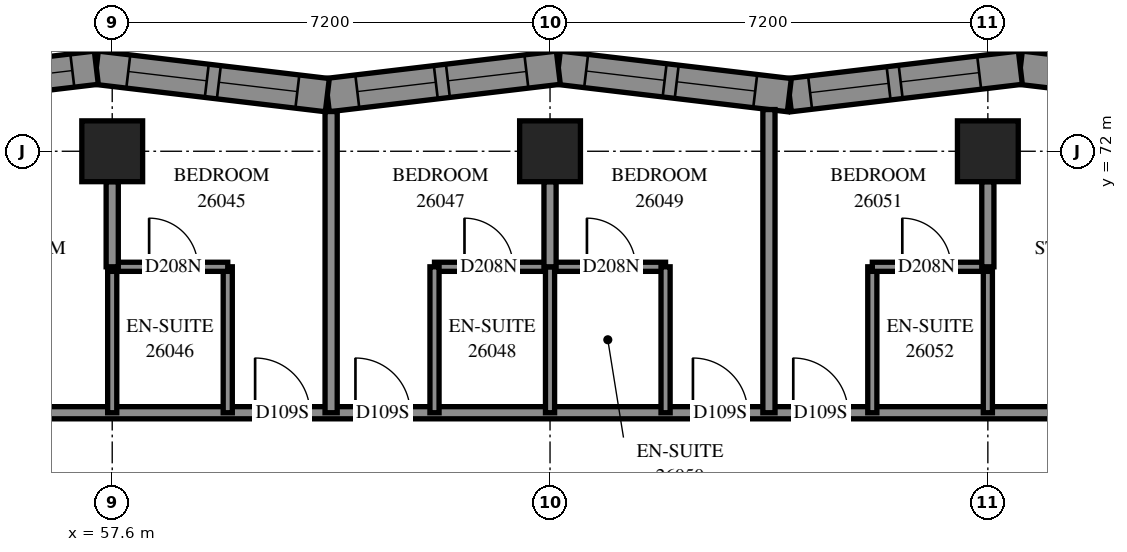
"""IFC4 building model, lengths in metres.
Left out: names, types, materials, properties, quantities, classifications, styles, units other than length and angle.
Written with IfcOpenShell. Run it as: python <this file> out.ifc"""

import sys

from ifc_helpers import new_model, si_unit, direction, frame, frame_2d, origin, origin_2d, place, context, subcontext, project, spatial, polyline, rectangle, outline, extrude, element, fill, save


model = new_model("IFC4")
c1 = context("Model", 3, precision=1e-05, world=origin(), true_north=direction((0.0, 1.0)))
c2 = subcontext(c1, "Body", "Model", "MODEL_VIEW")
j1 = project(units=[si_unit("LENGTHUNIT", "METRE"), si_unit("PLANEANGLEUNIT", "RADIAN")], contexts=[c1])
p1 = place(None, origin())
s1 = spatial("IfcSite", under=j1, at=p1, CompositionType="ELEMENT")
p2 = place(p1, origin())
s2 = spatial("IfcBuilding", under=s1, at=p2, CompositionType="ELEMENT")
p3 = place(p2, frame((0.0, 0.0, 98.2)))
s3 = spatial("IfcBuildingStorey", under=s2, at=p3, CompositionType="ELEMENT", Elevation=98.2)
for number, where, z_axis, x_axis in (
    (1, (57.6, 72.0, 0.0), (0.0, 0.0, 1.0), (1.0, 0.0, 0.0)),
    (2, (64.8, 72.0, 0.0), (0.0, 0.0, 1.0), (1.0, 0.0, 0.0)),
    (3, (72.0, 72.0, 0.0), (0.0, 0.0, 1.0), (1.0, 0.0, 0.0)),
):
    element("IfcColumn", number, at=place(p3, frame(where, z_axis=z_axis, x_axis=x_axis)), inside=s3, PredefinedType="COLUMN", context=c2, shape_type="SweptSolid", body=[
        extrude(rectangle(XDim=1.0, YDim=1.0, at=origin_2d()), origin(), (0.0, 0.0, 1.0), 3.1),
    ])
p4 = place(p3, frame((76.355, 72.921, 0.0), z_axis=(0.0, 0.0, 1.0), x_axis=(-0.9930244072, 0.1179089763, 0.0)))
e4 = element("IfcWall", 4, at=p4, inside=s3, PredefinedType="SOLIDWALL", context=c2, shape_type="SweptSolid", body=[
    extrude(outline(polyline([(0.054, -0.275), (3.88, -0.275), (3.814, 0.275), (-0.054, 0.275), (0.054, -0.275)])), origin(), (0.0, 0.0, 1.0), 3.1),
])
p5 = place(p4, frame((1.587, 0.0, 0.5)))
e5 = element("IfcOpeningElement", 5, at=p5, cuts=e4, PredefinedType="OPENING", context=c2, shape_type="SweptSolid", body=[
    extrude(rectangle(XDim=1.2, YDim=2.45, at=frame_2d((0.6, 1.225))), frame((0.0, 0.285, 0.0), z_axis=(0.0, -1.0, 0.0), x_axis=(1.0, 0.0, 0.0)), (0.0, 0.0, 1.0), 0.57),
])
p6 = place(p3, frame((72.534, 73.374, 0.0), z_axis=(0.0, 0.0, 1.0), x_axis=(-0.9930269402, -0.1178876415, 0.0)))
e6 = element("IfcWall", 6, at=p6, inside=s3, PredefinedType="SOLIDWALL", context=c2, shape_type="SweptSolid", body=[
    extrude(outline(polyline([(-0.033, -0.275), (3.793, -0.275), (3.858, 0.275), (0.033, 0.275), (-0.033, -0.275)])), origin(), (0.0, 0.0, 1.0), 3.1),
])
p7 = place(p6, frame((0.682, 0.0, 0.5)))
e7 = element("IfcOpeningElement", 7, at=p7, cuts=e6, PredefinedType="OPENING", context=c2, shape_type="SweptSolid", body=[
    extrude(rectangle(XDim=1.3, YDim=2.45, at=frame_2d((0.65, 1.225))), frame((0.0, 0.285, 0.0), z_axis=(0.0, -1.0, 0.0), x_axis=(1.0, 0.0, 0.0)), (0.0, 0.0, 1.0), 0.57),
])
p8 = place(p6, frame((2.182, 0.0, 0.5)))
e8 = element("IfcOpeningElement", 8, at=p8, cuts=e6, PredefinedType="OPENING", context=c2, shape_type="SweptSolid", body=[
    extrude(rectangle(XDim=1.3, YDim=2.45, at=frame_2d((0.65, 1.225))), frame((0.0, 0.285, 0.0), z_axis=(0.0, -1.0, 0.0), x_axis=(1.0, 0.0, 0.0)), (0.0, 0.0, 1.0), 0.57),
])
p9 = place(p3, frame((68.736, 72.923, 0.0), z_axis=(0.0, 0.0, 1.0), x_axis=(-0.9930265769, 0.1178907016, 0.0)))
e9 = element("IfcWall", 9, at=p9, inside=s3, PredefinedType="SOLIDWALL", context=c2, shape_type="SweptSolid", body=[
    extrude(outline(polyline([(0.033, -0.275), (3.858, -0.275), (3.793, 0.275), (-0.033, 0.275), (0.033, -0.275)])), origin(), (0.0, 0.0, 1.0), 3.1),
])
p10 = place(p9, frame((0.565, 0.0, 0.5)))
e10 = element("IfcOpeningElement", 10, at=p10, cuts=e9, PredefinedType="OPENING", context=c2, shape_type="SweptSolid", body=[
    extrude(rectangle(XDim=1.3, YDim=2.45, at=frame_2d((0.65, 1.225))), frame((0.0, 0.285, 0.0), z_axis=(0.0, -1.0, 0.0), x_axis=(1.0, 0.0, 0.0)), (0.0, 0.0, 1.0), 0.57),
])
p11 = place(p9, frame((2.065, 0.0, 0.5)))
e11 = element("IfcOpeningElement", 11, at=p11, cuts=e9, PredefinedType="OPENING", context=c2, shape_type="SweptSolid", body=[
    extrude(rectangle(XDim=1.3, YDim=2.45, at=frame_2d((0.65, 1.225))), frame((0.0, 0.285, 0.0), z_axis=(0.0, -1.0, 0.0), x_axis=(1.0, 0.0, 0.0)), (0.0, 0.0, 1.0), 0.57),
])
p12 = place(p3, frame((64.937, 73.374, 0.0), z_axis=(0.0, 0.0, 1.0), x_axis=(-0.9930269402, -0.1178876415, 0.0)))
e12 = element("IfcWall", 12, at=p12, inside=s3, PredefinedType="SOLIDWALL", context=c2, shape_type="SweptSolid", body=[
    extrude(outline(polyline([(-0.033, -0.275), (3.793, -0.275), (3.858, 0.275), (0.033, 0.275), (-0.033, -0.275)])), origin(), (0.0, 0.0, 1.0), 3.1),
])
p13 = place(p12, frame((0.529, 0.0, 0.5)))
e13 = element("IfcOpeningElement", 13, at=p13, cuts=e12, PredefinedType="OPENING", context=c2, shape_type="SweptSolid", body=[
    extrude(rectangle(XDim=1.3, YDim=2.45, at=frame_2d((0.65, 1.225))), frame((0.0, 0.285, 0.0), z_axis=(0.0, -1.0, 0.0), x_axis=(1.0, 0.0, 0.0)), (0.0, 0.0, 1.0), 0.57),
])
p14 = place(p12, frame((2.029, 0.0, 0.5)))
e14 = element("IfcOpeningElement", 14, at=p14, cuts=e12, PredefinedType="OPENING", context=c2, shape_type="SweptSolid", body=[
    extrude(rectangle(XDim=1.3, YDim=2.45, at=frame_2d((0.65, 1.225))), frame((0.0, 0.285, 0.0), z_axis=(0.0, -1.0, 0.0), x_axis=(1.0, 0.0, 0.0)), (0.0, 0.0, 1.0), 0.57),
])
p15 = place(p3, frame((61.138, 72.923, 0.0), z_axis=(0.0, 0.0, 1.0), x_axis=(-0.9930269402, 0.1178876415, 0.0)))
e15 = element("IfcWall", 15, at=p15, inside=s3, PredefinedType="SOLIDWALL", context=c2, shape_type="SweptSolid", body=[
    extrude(outline(polyline([(0.033, -0.275), (3.858, -0.275), (3.793, 0.275), (-0.033, 0.275), (0.033, -0.275)])), origin(), (0.0, 0.0, 1.0), 3.1),
])
p16 = place(p15, frame((0.496, 0.0, 0.5)))
e16 = element("IfcOpeningElement", 16, at=p16, cuts=e15, PredefinedType="OPENING", context=c2, shape_type="SweptSolid", body=[
    extrude(rectangle(XDim=1.3, YDim=2.45, at=frame_2d((0.65, 1.225))), frame((0.0, 0.285, 0.0), z_axis=(0.0, -1.0, 0.0), x_axis=(1.0, 0.0, 0.0)), (0.0, 0.0, 1.0), 0.57),
])
p17 = place(p15, frame((1.996, 0.0, 0.5)))
e17 = element("IfcOpeningElement", 17, at=p17, cuts=e15, PredefinedType="OPENING", context=c2, shape_type="SweptSolid", body=[
    extrude(rectangle(XDim=1.3, YDim=2.45, at=frame_2d((0.65, 1.225))), frame((0.0, 0.285, 0.0), z_axis=(0.0, -1.0, 0.0), x_axis=(1.0, 0.0, 0.0)), (0.0, 0.0, 1.0), 0.57),
])
p18 = place(p3, frame((57.339, 73.374, 0.0), z_axis=(0.0, 0.0, 1.0), x_axis=(-0.9930265769, -0.1178907016, 0.0)))
e18 = element("IfcWall", 18, at=p18, inside=s3, PredefinedType="SOLIDWALL", context=c2, shape_type="SweptSolid", body=[
    extrude(outline(polyline([(-0.033, -0.275), (3.793, -0.275), (3.858, 0.275), (0.033, 0.275), (-0.033, -0.275)])), origin(), (0.0, 0.0, 1.0), 3.1),
])
p19 = place(p18, frame((0.397, 0.0, 0.5)))
e19 = element("IfcOpeningElement", 19, at=p19, cuts=e18, PredefinedType="OPENING", context=c2, shape_type="SweptSolid", body=[
    extrude(rectangle(XDim=1.3, YDim=2.45, at=frame_2d((0.65, 1.225))), frame((0.0, 0.285, 0.0), z_axis=(0.0, -1.0, 0.0), x_axis=(1.0, 0.0, 0.0)), (0.0, 0.0, 1.0), 0.57),
])
p20 = place(p18, frame((1.897, 0.0, 0.5)))
e20 = element("IfcOpeningElement", 20, at=p20, cuts=e18, PredefinedType="OPENING", context=c2, shape_type="SweptSolid", body=[
    extrude(rectangle(XDim=1.3, YDim=2.45, at=frame_2d((0.65, 1.225))), frame((0.0, 0.285, 0.0), z_axis=(0.0, -1.0, 0.0), x_axis=(1.0, 0.0, 0.0)), (0.0, 0.0, 1.0), 0.57),
])
p21 = place(p3, frame((54.7, 67.7, 0.0), z_axis=(0.0, 0.0, 1.0), x_axis=(1.0, 0.0, 0.0)))
e21 = element("IfcWall", 21, at=p21, inside=s3, PredefinedType="PARTITIONING", context=c2, shape_type="SweptSolid", body=[
    extrude(rectangle(XDim=20.2, YDim=0.2, at=frame_2d((10.1, 0.0))), origin(), (0.0, 0.0, 1.0), 3.1),
])
p22 = place(p21, frame((5.25, 0.0, 0.0)))
e22 = element("IfcOpeningElement", 22, at=p22, cuts=e21, PredefinedType="OPENING", context=c2, shape_type="SweptSolid", body=[
    extrude(rectangle(XDim=0.9, YDim=2.1, at=frame_2d((0.45, 1.05))), frame((0.0, 0.11, 0.0), z_axis=(0.0, -1.0, 0.0), x_axis=(1.0, 0.0, 0.0)), (0.0, 0.0, 1.0), 0.22),
])
p23 = place(p21, frame((6.9, 0.0, 0.0)))
e23 = element("IfcOpeningElement", 23, at=p23, cuts=e21, PredefinedType="OPENING", context=c2, shape_type="SweptSolid", body=[
    extrude(rectangle(XDim=0.9, YDim=2.1, at=frame_2d((0.45, 1.05))), frame((0.0, 0.11, 0.0), z_axis=(0.0, -1.0, 0.0), x_axis=(1.0, 0.0, 0.0)), (0.0, 0.0, 1.0), 0.22),
])
p24 = place(p21, frame((12.45, 0.0, 0.0)))
e24 = element("IfcOpeningElement", 24, at=p24, cuts=e21, PredefinedType="OPENING", context=c2, shape_type="SweptSolid", body=[
    extrude(rectangle(XDim=0.9, YDim=2.1, at=frame_2d((0.45, 1.05))), frame((0.0, 0.11, 0.0), z_axis=(0.0, -1.0, 0.0), x_axis=(1.0, 0.0, 0.0)), (0.0, 0.0, 1.0), 0.22),
])
p25 = place(p21, frame((14.1, 0.0, 0.0)))
e25 = element("IfcOpeningElement", 25, at=p25, cuts=e21, PredefinedType="OPENING", context=c2, shape_type="SweptSolid", body=[
    extrude(rectangle(XDim=0.9, YDim=2.1, at=frame_2d((0.45, 1.05))), frame((0.0, 0.11, 0.0), z_axis=(0.0, -1.0, 0.0), x_axis=(1.0, 0.0, 0.0)), (0.0, 0.0, 1.0), 0.22),
])
p26 = place(p3, frame((68.4, 67.7, 0.0), z_axis=(0.0, 0.0, 1.0), x_axis=(0.0, 1.0, 0.0)))
e26 = element("IfcWall", 26, at=p26, inside=s3, PredefinedType="PARTITIONING", context=c2, shape_type="SweptSolid", body=[
    extrude(rectangle(XDim=4.986, YDim=0.2, at=frame_2d((2.493, 0.0))), origin(), (0.0, 0.0, 1.0), 3.1),
])
p27 = place(p3, frame((61.2, 67.7, 0.0), z_axis=(0.0, 0.0, 1.0), x_axis=(0.0, 1.0, 0.0)))
e27 = element("IfcWall", 27, at=p27, inside=s3, PredefinedType="PARTITIONING", context=c2, shape_type="SweptSolid", body=[
    extrude(rectangle(XDim=4.954, YDim=0.2, at=frame_2d((2.477, 0.0))), origin(), (0.0, 0.0, 1.0), 3.1),
])
p28 = place(p3, frame((62.9, 70.1, 0.0), z_axis=(0.0, 0.0, 1.0), x_axis=(1.0, 0.0, 0.0)))
e28 = element("IfcWall", 28, at=p28, inside=s3, PredefinedType="PARTITIONING", context=c2, shape_type="SweptSolid", body=[
    extrude(rectangle(XDim=3.8, YDim=0.15, at=frame_2d((1.9, 0.0))), origin(), (0.0, 0.0, 1.0), 3.1),
])
p29 = place(p28, frame((0.493, 0.0, 0.0)))
e29 = element("IfcOpeningElement", 29, at=p29, cuts=e28, PredefinedType="OPENING", context=c2, shape_type="SweptSolid", body=[
    extrude(rectangle(XDim=0.8, YDim=2.1, at=frame_2d((0.4, 1.05))), frame((0.0, 0.085, 0.0), z_axis=(0.0, -1.0, 0.0), x_axis=(1.0, 0.0, 0.0)), (0.0, 0.0, 1.0), 0.17),
])
p30 = place(p28, frame((2.507, 0.0, 0.0)))
e30 = element("IfcOpeningElement", 30, at=p30, cuts=e28, PredefinedType="OPENING", context=c2, shape_type="SweptSolid", body=[
    extrude(rectangle(XDim=0.8, YDim=2.1, at=frame_2d((0.4, 1.05))), frame((0.0, 0.085, 0.0), z_axis=(0.0, -1.0, 0.0), x_axis=(1.0, 0.0, 0.0)), (0.0, 0.0, 1.0), 0.17),
])
for number, where, z_axis, x_axis in (
    (31, (59.5, 67.7, 0.0), (0.0, 0.0, 1.0), (0.0, 1.0, 0.0)),
    (32, (57.6, 67.7, 0.0), (0.0, 0.0, 1.0), (0.0, 1.0, 0.0)),
    (33, (62.9, 67.7, 0.0), (0.0, 0.0, 1.0), (0.0, 1.0, 0.0)),
    (34, (64.8, 67.7, 0.0), (0.0, 0.0, 1.0), (0.0, 1.0, 0.0)),
    (35, (66.7, 67.7, 0.0), (0.0, 0.0, 1.0), (0.0, 1.0, 0.0)),
    (36, (70.1, 67.7, 0.0), (0.0, 0.0, 1.0), (0.0, 1.0, 0.0)),
    (37, (72.0, 67.7, 0.0), (0.0, 0.0, 1.0), (0.0, 1.0, 0.0)),
):
    element("IfcWall", number, at=place(p3, frame(where, z_axis=z_axis, x_axis=x_axis)), inside=s3, PredefinedType="PARTITIONING", context=c2, shape_type="SweptSolid", body=[
        extrude(rectangle(XDim=2.4, YDim=0.15, at=frame_2d((1.2, 0.0))), origin(), (0.0, 0.0, 1.0), 3.1),
    ])
p31 = place(p3, frame((70.1, 70.1, 0.0), z_axis=(0.0, 0.0, 1.0), x_axis=(1.0, 0.0, 0.0)))
e38 = element("IfcWall", 38, at=p31, inside=s3, PredefinedType="PARTITIONING", context=c2, shape_type="SweptSolid", body=[
    extrude(rectangle(XDim=1.9, YDim=0.15, at=frame_2d((0.95, 0.0))), origin(), (0.0, 0.0, 1.0), 3.1),
])
p32 = place(p31, frame((0.493, 0.0, 0.0)))
e39 = element("IfcOpeningElement", 39, at=p32, cuts=e38, PredefinedType="OPENING", context=c2, shape_type="SweptSolid", body=[
    extrude(rectangle(XDim=0.8, YDim=2.1, at=frame_2d((0.4, 1.05))), frame((0.0, 0.085, 0.0), z_axis=(0.0, -1.0, 0.0), x_axis=(1.0, 0.0, 0.0)), (0.0, 0.0, 1.0), 0.17),
])
p33 = place(p3, frame((57.6, 70.1, 0.0), z_axis=(0.0, 0.0, 1.0), x_axis=(1.0, 0.0, 0.0)))
e40 = element("IfcWall", 40, at=p33, inside=s3, PredefinedType="PARTITIONING", context=c2, shape_type="SweptSolid", body=[
    extrude(rectangle(XDim=1.9, YDim=0.15, at=frame_2d((0.95, 0.0))), origin(), (0.0, 0.0, 1.0), 3.1),
])
p34 = place(p33, frame((0.607, 0.0, 0.0)))
e41 = element("IfcOpeningElement", 41, at=p34, cuts=e40, PredefinedType="OPENING", context=c2, shape_type="SweptSolid", body=[
    extrude(rectangle(XDim=0.8, YDim=2.1, at=frame_2d((0.4, 1.05))), frame((0.0, 0.085, 0.0), z_axis=(0.0, -1.0, 0.0), x_axis=(1.0, 0.0, 0.0)), (0.0, 0.0, 1.0), 0.17),
])
for number, where, z_axis, x_axis in (
    (42, (57.6, 70.1, 0.0), (0.0, 0.0, 1.0), (0.0, 1.0, 0.0)),
    (43, (64.8, 70.1, 0.0), (0.0, 0.0, 1.0), (0.0, 1.0, 0.0)),
    (44, (72.0, 70.1, 0.0), (0.0, 0.0, 1.0), (0.0, 1.0, 0.0)),
):
    element("IfcWall", number, at=place(p3, frame(where, z_axis=z_axis, x_axis=x_axis)), inside=s3, PredefinedType="PARTITIONING", context=c2, shape_type="SweptSolid", body=[
        extrude(rectangle(XDim=1.4, YDim=0.2, at=frame_2d((0.7, 0.0))), origin(), (0.0, 0.0, 1.0), 3.1),
    ])
p35 = place(p7, origin())
e45 = element("IfcWindow", 45, at=p35, inside=s3, PartitioningType="SINGLE_PANEL", PredefinedType="WINDOW", context=c2, shape_type="SweptSolid", body=[
    extrude(rectangle(XDim=1.3, YDim=2.45, at=frame_2d((0.65, 1.225))), frame((0.0, 0.155, 0.0), z_axis=(0.0, -1.0, 0.0), x_axis=(1.0, 0.0, 0.0)), (0.0, 0.0, 1.0), 0.06),
])
fill(e7, e45)
p36 = place(p8, origin())
e46 = element("IfcWindow", 46, at=p36, inside=s3, PartitioningType="SINGLE_PANEL", PredefinedType="WINDOW", context=c2, shape_type="SweptSolid", body=[
    extrude(rectangle(XDim=1.3, YDim=2.45, at=frame_2d((0.65, 1.225))), frame((0.0, 0.155, 0.0), z_axis=(0.0, -1.0, 0.0), x_axis=(1.0, 0.0, 0.0)), (0.0, 0.0, 1.0), 0.06),
])
fill(e8, e46)
p37 = place(p10, origin())
e47 = element("IfcWindow", 47, at=p37, inside=s3, PartitioningType="SINGLE_PANEL", PredefinedType="WINDOW", context=c2, shape_type="SweptSolid", body=[
    extrude(rectangle(XDim=1.3, YDim=2.45, at=frame_2d((0.65, 1.225))), frame((0.0, 0.155, 0.0), z_axis=(0.0, -1.0, 0.0), x_axis=(1.0, 0.0, 0.0)), (0.0, 0.0, 1.0), 0.06),
])
fill(e10, e47)
p38 = place(p11, origin())
e48 = element("IfcWindow", 48, at=p38, inside=s3, PartitioningType="SINGLE_PANEL", PredefinedType="WINDOW", context=c2, shape_type="SweptSolid", body=[
    extrude(rectangle(XDim=1.3, YDim=2.45, at=frame_2d((0.65, 1.225))), frame((0.0, 0.155, 0.0), z_axis=(0.0, -1.0, 0.0), x_axis=(1.0, 0.0, 0.0)), (0.0, 0.0, 1.0), 0.06),
])
fill(e11, e48)
p39 = place(p13, origin())
e49 = element("IfcWindow", 49, at=p39, inside=s3, PartitioningType="SINGLE_PANEL", PredefinedType="WINDOW", context=c2, shape_type="SweptSolid", body=[
    extrude(rectangle(XDim=1.3, YDim=2.45, at=frame_2d((0.65, 1.225))), frame((0.0, 0.155, 0.0), z_axis=(0.0, -1.0, 0.0), x_axis=(1.0, 0.0, 0.0)), (0.0, 0.0, 1.0), 0.06),
])
fill(e13, e49)
p40 = place(p14, origin())
e50 = element("IfcWindow", 50, at=p40, inside=s3, PartitioningType="SINGLE_PANEL", PredefinedType="WINDOW", context=c2, shape_type="SweptSolid", body=[
    extrude(rectangle(XDim=1.3, YDim=2.45, at=frame_2d((0.65, 1.225))), frame((0.0, 0.155, 0.0), z_axis=(0.0, -1.0, 0.0), x_axis=(1.0, 0.0, 0.0)), (0.0, 0.0, 1.0), 0.06),
])
fill(e14, e50)
p41 = place(p16, origin())
e51 = element("IfcWindow", 51, at=p41, inside=s3, PartitioningType="SINGLE_PANEL", PredefinedType="WINDOW", context=c2, shape_type="SweptSolid", body=[
    extrude(rectangle(XDim=1.3, YDim=2.45, at=frame_2d((0.65, 1.225))), frame((0.0, 0.155, 0.0), z_axis=(0.0, -1.0, 0.0), x_axis=(1.0, 0.0, 0.0)), (0.0, 0.0, 1.0), 0.06),
])
fill(e16, e51)
p42 = place(p17, origin())
e52 = element("IfcWindow", 52, at=p42, inside=s3, PartitioningType="SINGLE_PANEL", PredefinedType="WINDOW", context=c2, shape_type="SweptSolid", body=[
    extrude(rectangle(XDim=1.3, YDim=2.45, at=frame_2d((0.65, 1.225))), frame((0.0, 0.155, 0.0), z_axis=(0.0, -1.0, 0.0), x_axis=(1.0, 0.0, 0.0)), (0.0, 0.0, 1.0), 0.06),
])
fill(e17, e52)
p43 = place(p19, origin())
e53 = element("IfcWindow", 53, at=p43, inside=s3, PartitioningType="SINGLE_PANEL", PredefinedType="WINDOW", context=c2, shape_type="SweptSolid", body=[
    extrude(rectangle(XDim=1.3, YDim=2.45, at=frame_2d((0.65, 1.225))), frame((0.0, 0.155, 0.0), z_axis=(0.0, -1.0, 0.0), x_axis=(1.0, 0.0, 0.0)), (0.0, 0.0, 1.0), 0.06),
])
fill(e19, e53)
p44 = place(p22, origin())
e54 = element("IfcDoor", 54, at=p44, inside=s3, OperationType="SINGLE_SWING_RIGHT", PredefinedType="DOOR", context=c2, shape_type="SweptSolid", body=[
    extrude(rectangle(XDim=0.9, YDim=2.1, at=frame_2d((0.45, 1.05))), frame((0.0, 0.025, 0.0), z_axis=(0.0, -1.0, 0.0), x_axis=(1.0, 0.0, 0.0)), (0.0, 0.0, 1.0), 0.05),
])
fill(e22, e54)
p45 = place(p34, origin())
e55 = element("IfcDoor", 55, at=p45, inside=s3, OperationType="SINGLE_SWING_RIGHT", PredefinedType="DOOR", context=c2, shape_type="SweptSolid", body=[
    extrude(rectangle(XDim=0.8, YDim=2.1, at=frame_2d((0.4, 1.05))), frame((0.0, 0.025, 0.0), z_axis=(0.0, -1.0, 0.0), x_axis=(1.0, 0.0, 0.0)), (0.0, 0.0, 1.0), 0.05),
])
fill(e41, e55)
p46 = place(p23, origin())
e56 = element("IfcDoor", 56, at=p46, inside=s3, OperationType="SINGLE_SWING_LEFT", PredefinedType="DOOR", context=c2, shape_type="SweptSolid", body=[
    extrude(rectangle(XDim=0.9, YDim=2.1, at=frame_2d((0.45, 1.05))), frame((0.0, 0.025, 0.0), z_axis=(0.0, -1.0, 0.0), x_axis=(1.0, 0.0, 0.0)), (0.0, 0.0, 1.0), 0.05),
])
fill(e23, e56)
p47 = place(p29, origin())
e57 = element("IfcDoor", 57, at=p47, inside=s3, OperationType="SINGLE_SWING_RIGHT", PredefinedType="DOOR", context=c2, shape_type="SweptSolid", body=[
    extrude(rectangle(XDim=0.8, YDim=2.1, at=frame_2d((0.4, 1.05))), frame((0.0, 0.025, 0.0), z_axis=(0.0, -1.0, 0.0), x_axis=(1.0, 0.0, 0.0)), (0.0, 0.0, 1.0), 0.05),
])
fill(e29, e57)
p48 = place(p24, origin())
e58 = element("IfcDoor", 58, at=p48, inside=s3, OperationType="SINGLE_SWING_RIGHT", PredefinedType="DOOR", context=c2, shape_type="SweptSolid", body=[
    extrude(rectangle(XDim=0.9, YDim=2.1, at=frame_2d((0.45, 1.05))), frame((0.0, 0.025, 0.0), z_axis=(0.0, -1.0, 0.0), x_axis=(1.0, 0.0, 0.0)), (0.0, 0.0, 1.0), 0.05),
])
fill(e24, e58)
p49 = place(p30, origin())
e59 = element("IfcDoor", 59, at=p49, inside=s3, OperationType="SINGLE_SWING_RIGHT", PredefinedType="DOOR", context=c2, shape_type="SweptSolid", body=[
    extrude(rectangle(XDim=0.8, YDim=2.1, at=frame_2d((0.4, 1.05))), frame((0.0, 0.025, 0.0), z_axis=(0.0, -1.0, 0.0), x_axis=(1.0, 0.0, 0.0)), (0.0, 0.0, 1.0), 0.05),
])
fill(e30, e59)
p50 = place(p25, origin())
e60 = element("IfcDoor", 60, at=p50, inside=s3, OperationType="SINGLE_SWING_LEFT", PredefinedType="DOOR", context=c2, shape_type="SweptSolid", body=[
    extrude(rectangle(XDim=0.9, YDim=2.1, at=frame_2d((0.45, 1.05))), frame((0.0, 0.025, 0.0), z_axis=(0.0, -1.0, 0.0), x_axis=(1.0, 0.0, 0.0)), (0.0, 0.0, 1.0), 0.05),
])
fill(e25, e60)
p51 = place(p32, origin())
e61 = element("IfcDoor", 61, at=p51, inside=s3, OperationType="SINGLE_SWING_RIGHT", PredefinedType="DOOR", context=c2, shape_type="SweptSolid", body=[
    extrude(rectangle(XDim=0.8, YDim=2.1, at=frame_2d((0.4, 1.05))), frame((0.0, 0.025, 0.0), z_axis=(0.0, -1.0, 0.0), x_axis=(1.0, 0.0, 0.0)), (0.0, 0.0, 1.0), 0.05),
])
fill(e39, e61)
save(model, sys.argv[1])
